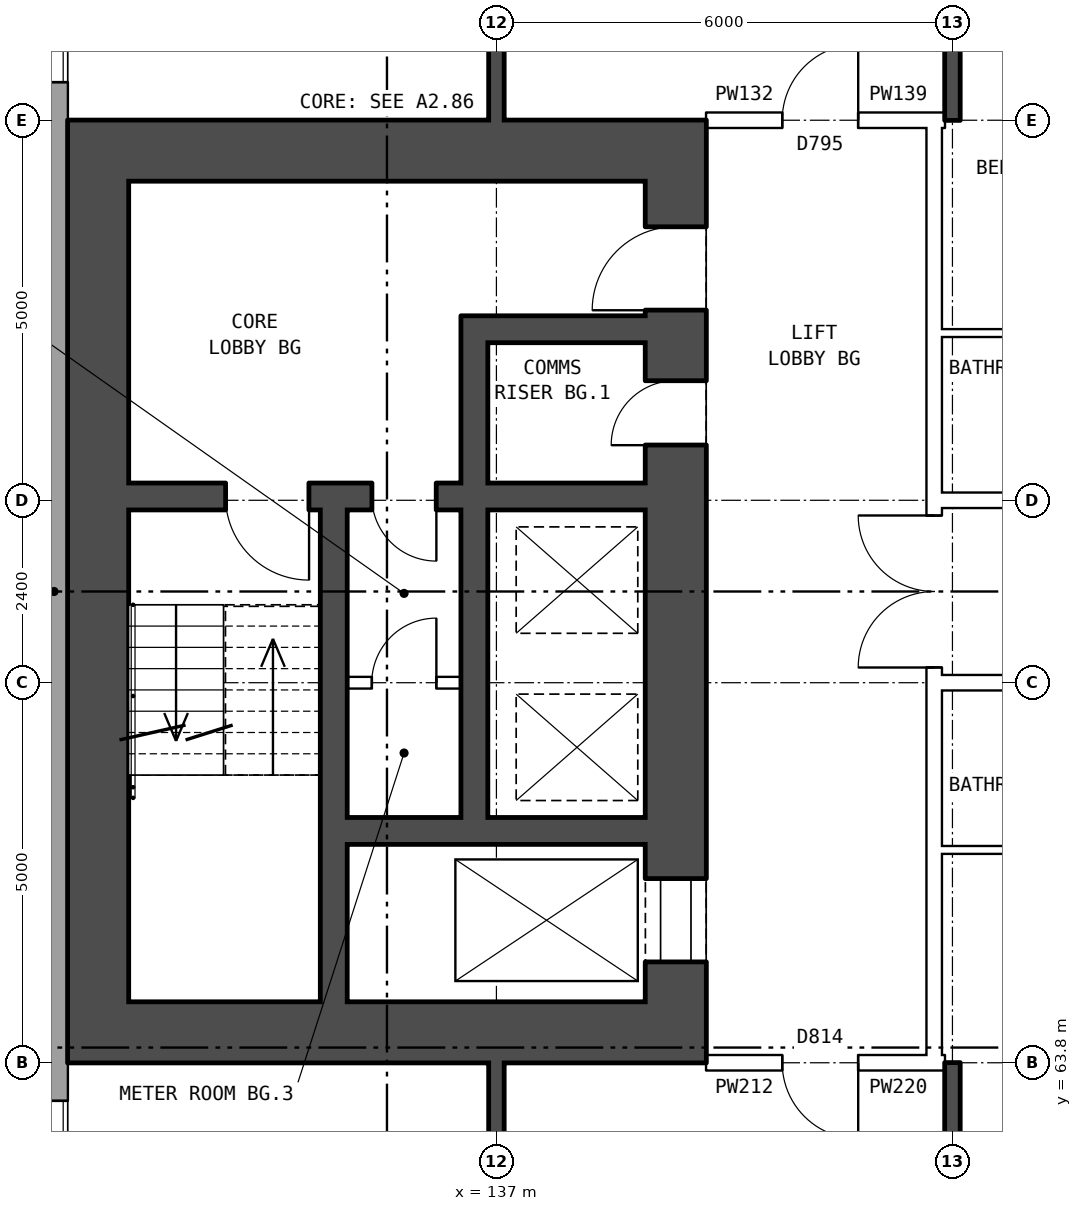
"""IFC4 building model, lengths in metres.
Left out: names, types, materials, properties, quantities, classifications, styles, units other than length and angle.
Written with IfcOpenShell. Run it as: python <this file> out.ifc"""

import sys

from ifc_helpers import new_model, si_unit, direction, frame, frame_2d, origin, place, context, subcontext, project, spatial, rectangle, extrude, element, fill, save


model = new_model("IFC4")
c1 = context("Model", 3, precision=1e-05, world=origin(), true_north=direction((0.0, 1.0)))
c2 = subcontext(c1, "Body", "Model", "MODEL_VIEW")
j1 = project(units=[si_unit("LENGTHUNIT", "METRE"), si_unit("PLANEANGLEUNIT", "RADIAN")], contexts=[c1])
p1 = place(None, origin())
s1 = spatial("IfcSite", under=j1, at=p1, CompositionType="ELEMENT")
p2 = place(p1, origin())
s2 = spatial("IfcBuilding", under=s1, at=p2, CompositionType="ELEMENT")
p3 = place(p2, frame((0.0, 0.0, 59.8)))
s3 = spatial("IfcBuildingStorey", under=s2, at=p3, CompositionType="ELEMENT", Elevation=59.8)
p4 = place(p3, frame((131.18, 82.925, 0.0), z_axis=(0.0, 0.0, 1.0), x_axis=(0.0, -1.0, 0.0)))
e1 = element("IfcWall", 1, at=p4, inside=s3, PredefinedType="STANDARD", context=c2, shape_type="SweptSolid", body=[
    extrude(rectangle(XDim=25.851, YDim=0.36, at=frame_2d((12.925, 0.0))), origin(), (0.0, 0.0, 1.0), 2.85),
])
p5 = place(p4, frame((1.625, 0.0, 0.8)))
e2 = element("IfcOpeningElement", 2, at=p5, cuts=e1, PredefinedType="OPENING", context=c2, shape_type="SweptSolid", body=[
    extrude(rectangle(XDim=1.6, YDim=1.8, at=frame_2d((0.8, 0.9))), frame((0.0, 0.19, 0.0), z_axis=(0.0, -1.0, 0.0), x_axis=(1.0, 0.0, 0.0)), (0.0, 0.0, 1.0), 0.38),
])
p6 = place(p4, frame((4.625, 0.0, 0.8)))
e3 = element("IfcOpeningElement", 3, at=p6, cuts=e1, PredefinedType="OPENING", context=c2, shape_type="SweptSolid", body=[
    extrude(rectangle(XDim=1.6, YDim=1.8, at=frame_2d((0.8, 0.9))), frame((0.0, 0.19, 0.0), z_axis=(0.0, -1.0, 0.0), x_axis=(1.0, 0.0, 0.0)), (0.0, 0.0, 1.0), 0.38),
])
p7 = place(p4, frame((19.625, 0.0, 0.8)))
e4 = element("IfcOpeningElement", 4, at=p7, cuts=e1, PredefinedType="OPENING", context=c2, shape_type="SweptSolid", body=[
    extrude(rectangle(XDim=1.6, YDim=1.8, at=frame_2d((0.8, 0.9))), frame((0.0, 0.19, 0.0), z_axis=(0.0, -1.0, 0.0), x_axis=(1.0, 0.0, 0.0)), (0.0, 0.0, 1.0), 0.38),
])
p8 = place(p4, frame((22.625, 0.0, 0.8)))
e5 = element("IfcOpeningElement", 5, at=p8, cuts=e1, PredefinedType="OPENING", context=c2, shape_type="SweptSolid", body=[
    extrude(rectangle(XDim=1.6, YDim=1.8, at=frame_2d((0.8, 0.9))), frame((0.0, 0.19, 0.0), z_axis=(0.0, -1.0, 0.0), x_axis=(1.0, 0.0, 0.0)), (0.0, 0.0, 1.0), 0.38),
])
p9 = place(p3, frame((139.36, 64.6, 0.0), z_axis=(0.0, 0.0, 1.0), x_axis=(0.0, 1.0, 0.0)))
e6 = element("IfcWall", 6, at=p9, inside=s3, PredefinedType="SHEAR", context=c2, shape_type="SweptSolid", body=[
    extrude(rectangle(XDim=10.8, YDim=0.8, at=frame_2d((5.4, 0.0))), origin(), (0.0, 0.0, 1.0), 2.85),
])
p10 = place(p9, frame((0.525, 0.0, 0.0)))
e7 = element("IfcOpeningElement", 7, at=p10, cuts=e6, PredefinedType="OPENING", context=c2, shape_type="SweptSolid", body=[
    extrude(rectangle(XDim=1.1, YDim=2.1, at=frame_2d((0.55, 1.05))), frame((0.0, 0.41, 0.0), z_axis=(0.0, -1.0, 0.0), x_axis=(1.0, 0.0, 0.0)), (0.0, 0.0, 1.0), 0.82),
])
p11 = place(p9, frame((9.1, 0.0, 0.0)))
e8 = element("IfcOpeningElement", 8, at=p11, cuts=e6, PredefinedType="OPENING", context=c2, shape_type="SweptSolid", body=[
    extrude(rectangle(XDim=1.1, YDim=2.1, at=frame_2d((0.55, 1.05))), frame((0.0, 0.41, 0.0), z_axis=(0.0, -1.0, 0.0), x_axis=(1.0, 0.0, 0.0)), (0.0, 0.0, 1.0), 0.82),
])
p12 = place(p9, frame((7.325, 0.0, 0.0)))
e9 = element("IfcOpeningElement", 9, at=p12, cuts=e6, PredefinedType="OPENING", context=c2, shape_type="SweptSolid", body=[
    extrude(rectangle(XDim=0.85, YDim=2.1, at=frame_2d((0.425, 1.05))), frame((0.0, 0.41, 0.0), z_axis=(0.0, -1.0, 0.0), x_axis=(1.0, 0.0, 0.0)), (0.0, 0.0, 1.0), 0.82),
])
p13 = place(p3, frame((131.76, 64.6, 0.0), z_axis=(0.0, 0.0, 1.0), x_axis=(0.0, 1.0, 0.0)))
e10 = element("IfcWall", 10, at=p13, inside=s3, PredefinedType="SHEAR", context=c2, shape_type="SweptSolid", body=[
    extrude(rectangle(XDim=10.8, YDim=0.8, at=frame_2d((5.4, 0.0))), origin(), (0.0, 0.0, 1.0), 2.85),
])
for number, where, z_axis, x_axis in (
    (11, (139.76, 64.2, 0.0), (0.0, 0.0, 1.0), (-1.0, 0.0, 0.0)),
    (12, (139.76, 75.8, 0.0), (0.0, 0.0, 1.0), (-1.0, 0.0, 0.0)),
):
    element("IfcWall", number, at=place(p3, frame(where, z_axis=z_axis, x_axis=x_axis)), inside=s3, PredefinedType="SHEAR", context=c2, shape_type="SweptSolid", body=[
        extrude(rectangle(XDim=8.4, YDim=0.8, at=frame_2d((4.2, 0.0))), origin(), (0.0, 0.0, 1.0), 2.85),
    ])
p14 = place(p3, frame((138.96, 66.85, 0.0), z_axis=(0.0, 0.0, 1.0), x_axis=(-1.0, 0.0, 0.0)))
e13 = element("IfcWall", 13, at=p14, inside=s3, PredefinedType="SHEAR", context=c2, shape_type="SweptSolid", body=[
    extrude(rectangle(XDim=3.925, YDim=0.35, at=frame_2d((1.962, 0.0))), origin(), (0.0, 0.0, 1.0), 2.85),
])
p15 = place(p3, frame((136.535, 68.8, 0.0), z_axis=(0.0, 0.0, 1.0), x_axis=(-1.0, 0.0, 0.0)))
e14 = element("IfcWall", 14, at=p15, inside=s3, PredefinedType="PARTITIONING", context=c2, shape_type="SweptSolid", body=[
    extrude(rectangle(XDim=1.5, YDim=0.15, at=frame_2d((0.75, 0.0))), origin(), (0.0, 0.0, 1.0), 2.85),
])
p16 = place(p15, frame((0.325, 0.0, 0.0)))
e15 = element("IfcOpeningElement", 15, at=p16, cuts=e14, PredefinedType="OPENING", context=c2, shape_type="SweptSolid", body=[
    extrude(rectangle(XDim=0.85, YDim=2.1, at=frame_2d((0.425, 1.05))), frame((0.0, 0.085, 0.0), z_axis=(0.0, -1.0, 0.0), x_axis=(1.0, 0.0, 0.0)), (0.0, 0.0, 1.0), 0.17),
])
p17 = place(p3, frame((138.96, 71.25, 0.0), z_axis=(0.0, 0.0, 1.0), x_axis=(-1.0, 0.0, 0.0)))
e16 = element("IfcWall", 16, at=p17, inside=s3, PredefinedType="SHEAR", context=c2, shape_type="SweptSolid", body=[
    extrude(rectangle(XDim=6.8, YDim=0.35, at=frame_2d((3.4, 0.0))), origin(), (0.0, 0.0, 1.0), 2.85),
])
p18 = place(p17, frame((4.425, 0.0, 0.0)))
e17 = element("IfcOpeningElement", 17, at=p18, cuts=e16, PredefinedType="OPENING", context=c2, shape_type="SweptSolid", body=[
    extrude(rectangle(XDim=1.1, YDim=2.1, at=frame_2d((0.55, 1.05))), frame((0.0, 0.185, 0.0), z_axis=(0.0, -1.0, 0.0), x_axis=(1.0, 0.0, 0.0)), (0.0, 0.0, 1.0), 0.37),
])
p19 = place(p17, frame((2.75, 0.0, 0.0)))
e18 = element("IfcOpeningElement", 18, at=p19, cuts=e16, PredefinedType="OPENING", context=c2, shape_type="SweptSolid", body=[
    extrude(rectangle(XDim=0.85, YDim=2.1, at=frame_2d((0.425, 1.05))), frame((0.0, 0.185, 0.0), z_axis=(0.0, -1.0, 0.0), x_axis=(1.0, 0.0, 0.0)), (0.0, 0.0, 1.0), 0.37),
])
p20 = place(p3, frame((138.96, 73.45, 0.0), z_axis=(0.0, 0.0, 1.0), x_axis=(-1.0, 0.0, 0.0)))
e19 = element("IfcWall", 19, at=p20, inside=s3, PredefinedType="SHEAR", context=c2, shape_type="SweptSolid", body=[
    extrude(rectangle(XDim=2.075, YDim=0.35, at=frame_2d((1.038, 0.0))), origin(), (0.0, 0.0, 1.0), 2.85),
])
p21 = place(p3, frame((136.71, 67.025, 0.0), z_axis=(0.0, 0.0, 1.0), x_axis=(0.0, 1.0, 0.0)))
e20 = element("IfcWall", 20, at=p21, inside=s3, PredefinedType="SHEAR", context=c2, shape_type="SweptSolid", body=[
    extrude(rectangle(XDim=4.05, YDim=0.35, at=frame_2d((2.025, 0.0))), origin(), (0.0, 0.0, 1.0), 2.85),
])
p22 = place(p3, frame((136.71, 71.425, 0.0), z_axis=(0.0, 0.0, 1.0), x_axis=(0.0, 1.0, 0.0)))
e21 = element("IfcWall", 21, at=p22, inside=s3, PredefinedType="SHEAR", context=c2, shape_type="SweptSolid", body=[
    extrude(rectangle(XDim=2.2, YDim=0.35, at=frame_2d((1.1, 0.0))), origin(), (0.0, 0.0, 1.0), 2.85),
])
p23 = place(p3, frame((134.86, 64.6, 0.0), z_axis=(0.0, 0.0, 1.0), x_axis=(0.0, 1.0, 0.0)))
e22 = element("IfcWall", 22, at=p23, inside=s3, PredefinedType="SHEAR", context=c2, shape_type="SweptSolid", body=[
    extrude(rectangle(XDim=6.475, YDim=0.35, at=frame_2d((3.237, 0.0))), origin(), (0.0, 0.0, 1.0), 2.85),
])
p24 = place(p3, frame((142.76, 63.9, 0.0), z_axis=(0.0, 0.0, 1.0), x_axis=(0.0, 1.0, 0.0)))
e23 = element("IfcWall", 23, at=p24, inside=s3, PredefinedType="PARTITIONING", context=c2, shape_type="SweptSolid", body=[
    extrude(rectangle(XDim=12.2, YDim=0.2, at=frame_2d((6.1, 0.0))), origin(), (0.0, 0.0, 1.0), 2.85),
])
p25 = place(p24, frame((5.1, 0.0, 0.0)))
e24 = element("IfcOpeningElement", 24, at=p25, cuts=e23, PredefinedType="OPENING", context=c2, shape_type="SweptSolid", body=[
    extrude(rectangle(XDim=2.0, YDim=2.1, at=frame_2d((1.0, 1.05))), frame((0.0, 0.11, 0.0), z_axis=(0.0, -1.0, 0.0), x_axis=(1.0, 0.0, 0.0)), (0.0, 0.0, 1.0), 0.22),
])
p26 = place(p3, frame((139.76, 63.8, 0.0), z_axis=(0.0, 0.0, 1.0), x_axis=(1.0, 0.0, 0.0)))
e25 = element("IfcWall", 25, at=p26, inside=s3, PredefinedType="PARTITIONING", context=c2, shape_type="SweptSolid", body=[
    extrude(rectangle(XDim=3.0, YDim=0.2, at=frame_2d((1.5, 0.0))), origin(), (0.0, 0.0, 1.0), 2.85),
])
p27 = place(p26, frame((1.0, 0.0, 0.0)))
e26 = element("IfcOpeningElement", 26, at=p27, cuts=e25, PredefinedType="OPENING", context=c2, shape_type="SweptSolid", body=[
    extrude(rectangle(XDim=1.0, YDim=2.1, at=frame_2d((0.5, 1.05))), frame((0.0, 0.11, 0.0), z_axis=(0.0, -1.0, 0.0), x_axis=(1.0, 0.0, 0.0)), (0.0, 0.0, 1.0), 0.22),
])
p28 = place(p3, frame((142.76, 63.8, 0.0), z_axis=(0.0, 0.0, 1.0), x_axis=(1.0, 0.0, 0.0)))
e27 = element("IfcWall", 27, at=p28, inside=s3, PredefinedType="PARTITIONING", context=c2, shape_type="SweptSolid", body=[
    extrude(rectangle(XDim=0.14, YDim=0.2, at=frame_2d((0.07, 0.0))), origin(), (0.0, 0.0, 1.0), 2.85),
])
p29 = place(p3, frame((142.76, 66.6, 0.0), z_axis=(0.0, 0.0, 1.0), x_axis=(1.0, 0.0, 0.0)))
e28 = element("IfcWall", 28, at=p29, inside=s3, PredefinedType="PARTITIONING", context=c2, shape_type="SweptSolid", body=[
    extrude(rectangle(XDim=3.24, YDim=0.1, at=frame_2d((1.62, 0.0))), origin(), (0.0, 0.0, 1.0), 2.85),
])
p30 = place(p3, frame((142.76, 68.8, 0.0), z_axis=(0.0, 0.0, 1.0), x_axis=(1.0, 0.0, 0.0)))
e29 = element("IfcWall", 29, at=p30, inside=s3, PredefinedType="PARTITIONING", context=c2, shape_type="SweptSolid", body=[
    extrude(rectangle(XDim=14.48, YDim=0.2, at=frame_2d((7.24, 0.0))), origin(), (0.0, 0.0, 1.0), 2.85),
])
p31 = place(p30, frame((4.24, 0.0, 0.0)))
e30 = element("IfcOpeningElement", 30, at=p31, cuts=e29, PredefinedType="OPENING", context=c2, shape_type="SweptSolid", body=[
    extrude(rectangle(XDim=1.0, YDim=2.1, at=frame_2d((0.5, 1.05))), frame((0.0, 0.11, 0.0), z_axis=(0.0, -1.0, 0.0), x_axis=(1.0, 0.0, 0.0)), (0.0, 0.0, 1.0), 0.22),
])
p32 = place(p30, frame((7.24, 0.0, 0.0)))
e31 = element("IfcOpeningElement", 31, at=p32, cuts=e29, PredefinedType="OPENING", context=c2, shape_type="SweptSolid", body=[
    extrude(rectangle(XDim=1.0, YDim=2.1, at=frame_2d((0.5, 1.05))), frame((0.0, 0.11, 0.0), z_axis=(0.0, -1.0, 0.0), x_axis=(1.0, 0.0, 0.0)), (0.0, 0.0, 1.0), 0.22),
])
p33 = place(p3, frame((142.76, 71.2, 0.0), z_axis=(0.0, 0.0, 1.0), x_axis=(1.0, 0.0, 0.0)))
e32 = element("IfcWall", 32, at=p33, inside=s3, PredefinedType="PARTITIONING", context=c2, shape_type="SweptSolid", body=[
    extrude(rectangle(XDim=14.48, YDim=0.2, at=frame_2d((7.24, 0.0))), origin(), (0.0, 0.0, 1.0), 2.85),
])
p34 = place(p33, frame((4.24, 0.0, 0.0)))
e33 = element("IfcOpeningElement", 33, at=p34, cuts=e32, PredefinedType="OPENING", context=c2, shape_type="SweptSolid", body=[
    extrude(rectangle(XDim=1.0, YDim=2.1, at=frame_2d((0.5, 1.05))), frame((0.0, 0.11, 0.0), z_axis=(0.0, -1.0, 0.0), x_axis=(1.0, 0.0, 0.0)), (0.0, 0.0, 1.0), 0.22),
])
p35 = place(p33, frame((7.24, 0.0, 0.0)))
e34 = element("IfcOpeningElement", 34, at=p35, cuts=e32, PredefinedType="OPENING", context=c2, shape_type="SweptSolid", body=[
    extrude(rectangle(XDim=1.0, YDim=2.1, at=frame_2d((0.5, 1.05))), frame((0.0, 0.11, 0.0), z_axis=(0.0, -1.0, 0.0), x_axis=(1.0, 0.0, 0.0)), (0.0, 0.0, 1.0), 0.22),
])
p36 = place(p3, frame((142.76, 73.4, 0.0), z_axis=(0.0, 0.0, 1.0), x_axis=(1.0, 0.0, 0.0)))
e35 = element("IfcWall", 35, at=p36, inside=s3, PredefinedType="PARTITIONING", context=c2, shape_type="SweptSolid", body=[
    extrude(rectangle(XDim=3.24, YDim=0.1, at=frame_2d((1.62, 0.0))), origin(), (0.0, 0.0, 1.0), 2.85),
])
p37 = place(p3, frame((139.76, 76.2, 0.0), z_axis=(0.0, 0.0, 1.0), x_axis=(1.0, 0.0, 0.0)))
e36 = element("IfcWall", 36, at=p37, inside=s3, PredefinedType="PARTITIONING", context=c2, shape_type="SweptSolid", body=[
    extrude(rectangle(XDim=3.0, YDim=0.2, at=frame_2d((1.5, 0.0))), origin(), (0.0, 0.0, 1.0), 2.85),
])
p38 = place(p37, frame((1.0, 0.0, 0.0)))
e37 = element("IfcOpeningElement", 37, at=p38, cuts=e36, PredefinedType="OPENING", context=c2, shape_type="SweptSolid", body=[
    extrude(rectangle(XDim=1.0, YDim=2.1, at=frame_2d((0.5, 1.05))), frame((0.0, 0.11, 0.0), z_axis=(0.0, -1.0, 0.0), x_axis=(1.0, 0.0, 0.0)), (0.0, 0.0, 1.0), 0.22),
])
p39 = place(p3, frame((142.76, 76.2, 0.0), z_axis=(0.0, 0.0, 1.0), x_axis=(1.0, 0.0, 0.0)))
e38 = element("IfcWall", 38, at=p39, inside=s3, PredefinedType="PARTITIONING", context=c2, shape_type="SweptSolid", body=[
    extrude(rectangle(XDim=0.14, YDim=0.2, at=frame_2d((0.07, 0.0))), origin(), (0.0, 0.0, 1.0), 2.85),
])
p40 = place(p3, frame((137.0, 54.36, 0.0), z_axis=(0.0, 0.0, 1.0), x_axis=(0.0, 1.0, 0.0)))
e39 = element("IfcWall", 39, at=p40, inside=s3, PredefinedType="SOLIDWALL", context=c2, shape_type="SweptSolid", body=[
    extrude(rectangle(XDim=9.44, YDim=0.2, at=frame_2d((4.72, 0.0))), origin(), (0.0, 0.0, 1.0), 2.85),
])
p41 = place(p40, frame((2.47, 0.0, 0.0)))
e40 = element("IfcOpeningElement", 40, at=p41, cuts=e39, PredefinedType="OPENING", context=c2, shape_type="SweptSolid", body=[
    extrude(rectangle(XDim=0.9, YDim=2.1, at=frame_2d((0.45, 1.05))), frame((0.0, 0.11, 0.0), z_axis=(0.0, -1.0, 0.0), x_axis=(1.0, 0.0, 0.0)), (0.0, 0.0, 1.0), 0.22),
])
p42 = place(p40, frame((7.59, 0.0, 0.0)))
e41 = element("IfcOpeningElement", 41, at=p42, cuts=e39, PredefinedType="OPENING", context=c2, shape_type="SweptSolid", body=[
    extrude(rectangle(XDim=0.9, YDim=2.1, at=frame_2d((0.45, 1.05))), frame((0.0, 0.11, 0.0), z_axis=(0.0, -1.0, 0.0), x_axis=(1.0, 0.0, 0.0)), (0.0, 0.0, 1.0), 0.22),
])
p43 = place(p3, frame((137.0, 76.2, 0.0), z_axis=(0.0, 0.0, 1.0), x_axis=(0.0, 1.0, 0.0)))
e42 = element("IfcWall", 42, at=p43, inside=s3, PredefinedType="SOLIDWALL", context=c2, shape_type="SweptSolid", body=[
    extrude(rectangle(XDim=9.44, YDim=0.2, at=frame_2d((4.72, 0.0))), origin(), (0.0, 0.0, 1.0), 2.85),
])
p44 = place(p43, frame((1.5, 0.0, 0.0)))
e43 = element("IfcOpeningElement", 43, at=p44, cuts=e42, PredefinedType="OPENING", context=c2, shape_type="SweptSolid", body=[
    extrude(rectangle(XDim=0.9, YDim=2.1, at=frame_2d((0.45, 1.05))), frame((0.0, 0.11, 0.0), z_axis=(0.0, -1.0, 0.0), x_axis=(1.0, 0.0, 0.0)), (0.0, 0.0, 1.0), 0.22),
])
for number, where, z_axis, x_axis in (
    (44, (143.0, 54.36, 0.0), (0.0, 0.0, 1.0), (0.0, 1.0, 0.0)),
    (45, (143.0, 76.2, 0.0), (0.0, 0.0, 1.0), (0.0, 1.0, 0.0)),
):
    element("IfcWall", number, at=place(p3, frame(where, z_axis=z_axis, x_axis=x_axis)), inside=s3, PredefinedType="SOLIDWALL", context=c2, shape_type="SweptSolid", body=[
        extrude(rectangle(XDim=9.44, YDim=0.2, at=frame_2d((4.72, 0.0))), origin(), (0.0, 0.0, 1.0), 2.85),
    ])
p45 = place(p6, origin())
e46 = element("IfcWindow", 46, at=p45, inside=s3, PartitioningType="SINGLE_PANEL", PredefinedType="WINDOW", context=c2, shape_type="SweptSolid", body=[
    extrude(rectangle(XDim=1.6, YDim=1.8, at=frame_2d((0.8, 0.9))), frame((0.0, 0.15, 0.0), z_axis=(0.0, -1.0, 0.0), x_axis=(1.0, 0.0, 0.0)), (0.0, 0.0, 1.0), 0.06),
])
fill(e3, e46)
p46 = place(p7, origin())
e47 = element("IfcWindow", 47, at=p46, inside=s3, PartitioningType="SINGLE_PANEL", PredefinedType="WINDOW", context=c2, shape_type="SweptSolid", body=[
    extrude(rectangle(XDim=1.6, YDim=1.8, at=frame_2d((0.8, 0.9))), frame((0.0, 0.15, 0.0), z_axis=(0.0, -1.0, 0.0), x_axis=(1.0, 0.0, 0.0)), (0.0, 0.0, 1.0), 0.06),
])
fill(e4, e47)
p47 = place(p10, origin())
e48 = element("IfcDoor", 48, at=p47, inside=s3, OperationType="DOUBLE_DOOR_SLIDING", PredefinedType="DOOR", context=c2, shape_type="SweptSolid", body=[
    extrude(rectangle(XDim=1.1, YDim=2.1, at=frame_2d((0.55, 1.05))), frame((0.0, 0.385, 0.0), z_axis=(0.0, -1.0, 0.0), x_axis=(1.0, 0.0, 0.0)), (0.0, 0.0, 1.0), 0.05),
])
fill(e7, e48)
p48 = place(p11, origin())
e49 = element("IfcDoor", 49, at=p48, inside=s3, OperationType="SINGLE_SWING_LEFT", PredefinedType="DOOR", context=c2, shape_type="SweptSolid", body=[
    extrude(rectangle(XDim=1.1, YDim=2.1, at=frame_2d((0.55, 1.05))), frame((0.0, 0.385, 0.0), z_axis=(0.0, -1.0, 0.0), x_axis=(1.0, 0.0, 0.0)), (0.0, 0.0, 1.0), 0.05),
])
fill(e8, e49)
p49 = place(p18, origin())
e50 = element("IfcDoor", 50, at=p49, inside=s3, OperationType="SINGLE_SWING_LEFT", PredefinedType="DOOR", context=c2, shape_type="SweptSolid", body=[
    extrude(rectangle(XDim=1.1, YDim=2.1, at=frame_2d((0.55, 1.05))), frame((0.0, 0.025, 0.0), z_axis=(0.0, -1.0, 0.0), x_axis=(1.0, 0.0, 0.0)), (0.0, 0.0, 1.0), 0.05),
])
fill(e17, e50)
p50 = place(p12, origin())
e51 = element("IfcDoor", 51, at=p50, inside=s3, OperationType="SINGLE_SWING_LEFT", PredefinedType="DOOR", context=c2, shape_type="SweptSolid", body=[
    extrude(rectangle(XDim=0.85, YDim=2.1, at=frame_2d((0.425, 1.05))), frame((0.0, 0.385, 0.0), z_axis=(0.0, -1.0, 0.0), x_axis=(1.0, 0.0, 0.0)), (0.0, 0.0, 1.0), 0.05),
])
fill(e9, e51)
p51 = place(p19, origin())
e52 = element("IfcDoor", 52, at=p51, inside=s3, OperationType="SINGLE_SWING_LEFT", PredefinedType="DOOR", context=c2, shape_type="SweptSolid", body=[
    extrude(rectangle(XDim=0.85, YDim=2.1, at=frame_2d((0.425, 1.05))), frame((0.0, 0.025, 0.0), z_axis=(0.0, -1.0, 0.0), x_axis=(1.0, 0.0, 0.0)), (0.0, 0.0, 1.0), 0.05),
])
fill(e18, e52)
p52 = place(p16, frame((0.85, 0.0, 0.0), z_axis=(0.0, 0.0, 1.0), x_axis=(-1.0, 0.0, 0.0)))
e53 = element("IfcDoor", 53, at=p52, inside=s3, OperationType="SINGLE_SWING_RIGHT", PredefinedType="DOOR", context=c2, shape_type="SweptSolid", body=[
    extrude(rectangle(XDim=0.85, YDim=2.1, at=frame_2d((0.425, 1.05))), frame((0.0, 0.025, 0.0), z_axis=(0.0, -1.0, 0.0), x_axis=(1.0, 0.0, 0.0)), (0.0, 0.0, 1.0), 0.05),
])
fill(e15, e53)
p53 = place(p25, origin())
e54 = element("IfcDoor", 54, at=p53, inside=s3, OperationType="DOUBLE_DOOR_SINGLE_SWING", PredefinedType="DOOR", context=c2, shape_type="SweptSolid", body=[
    extrude(rectangle(XDim=2.0, YDim=2.1, at=frame_2d((1.0, 1.05))), frame((0.0, 0.025, 0.0), z_axis=(0.0, -1.0, 0.0), x_axis=(1.0, 0.0, 0.0)), (0.0, 0.0, 1.0), 0.05),
])
fill(e24, e54)
p54 = place(p27, frame((1.0, 0.0, 0.0), z_axis=(0.0, 0.0, 1.0), x_axis=(-1.0, 0.0, 0.0)))
e55 = element("IfcDoor", 55, at=p54, inside=s3, OperationType="SINGLE_SWING_LEFT", PredefinedType="DOOR", context=c2, shape_type="SweptSolid", body=[
    extrude(rectangle(XDim=1.0, YDim=2.1, at=frame_2d((0.5, 1.05))), frame((0.0, 0.025, 0.0), z_axis=(0.0, -1.0, 0.0), x_axis=(1.0, 0.0, 0.0)), (0.0, 0.0, 1.0), 0.05),
])
fill(e26, e55)
p55 = place(p38, origin())
e56 = element("IfcDoor", 56, at=p55, inside=s3, OperationType="SINGLE_SWING_RIGHT", PredefinedType="DOOR", context=c2, shape_type="SweptSolid", body=[
    extrude(rectangle(XDim=1.0, YDim=2.1, at=frame_2d((0.5, 1.05))), frame((0.0, 0.025, 0.0), z_axis=(0.0, -1.0, 0.0), x_axis=(1.0, 0.0, 0.0)), (0.0, 0.0, 1.0), 0.05),
])
fill(e37, e56)
save(model, sys.argv[1])
